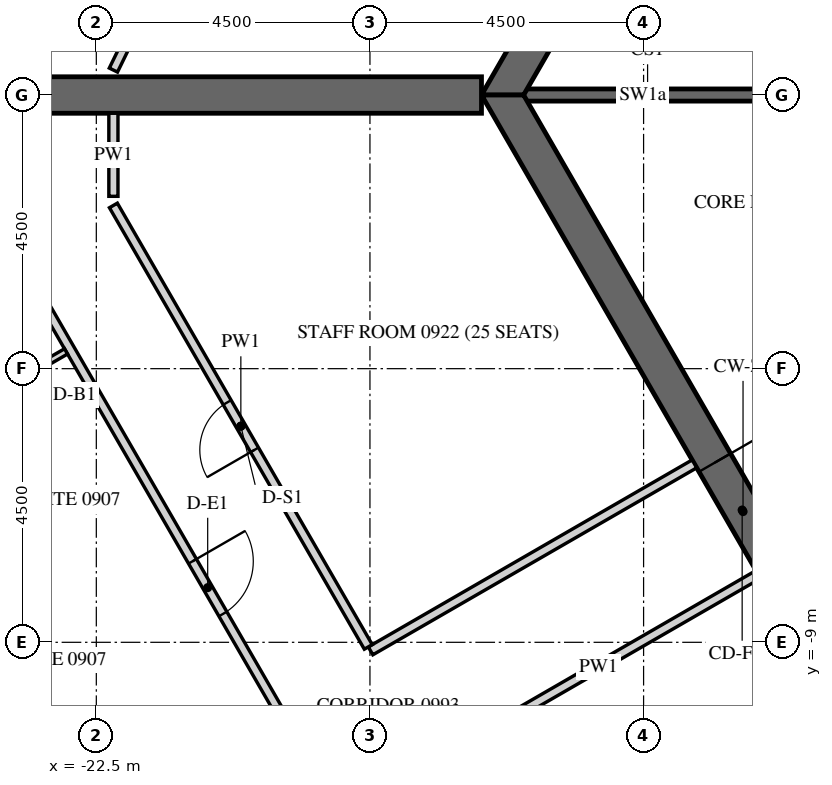
"""IFC4 building model, lengths in metres.
Left out: names, types, materials, properties, quantities, classifications, styles, units other than length and angle.
Written with IfcOpenShell. Run it as: python <this file> out.ifc"""

import sys

from ifc_helpers import new_model, si_unit, direction, frame, frame_2d, origin, place, context, subcontext, project, spatial, polyline, rectangle, outline, extrude, element, fill, save


model = new_model("IFC4")
c1 = context("Model", 3, precision=1e-05, world=origin(), true_north=direction((0.0, 1.0)))
c2 = subcontext(c1, "Body", "Model", "MODEL_VIEW")
j1 = project(units=[si_unit("LENGTHUNIT", "METRE"), si_unit("PLANEANGLEUNIT", "RADIAN")], contexts=[c1])
p1 = place(None, origin())
s1 = spatial("IfcSite", under=j1, at=p1, CompositionType="ELEMENT")
p2 = place(p1, origin())
s2 = spatial("IfcBuilding", under=s1, at=p2, CompositionType="ELEMENT")
p3 = place(p2, frame((0.0, 0.0, 123.3)))
s3 = spatial("IfcBuildingStorey", under=s2, at=p3, CompositionType="ELEMENT", Elevation=123.3)
p4 = place(p3, frame((-19.595, 27.633, -0.15), z_axis=(0.0, 0.0, 1.0), x_axis=(-0.438368285794, -0.898795441694, 0.0)))
e1 = element("IfcWall", 1, at=p4, inside=s3, PredefinedType="SOLIDWALL", context=c2, shape_type="SweptSolid", body=[
    extrude(outline(polyline([(-0.026, -0.275), (30.093, -0.275), (30.048, 0.275), (0.026, 0.275), (-0.026, -0.275)])), origin(), (0.0, 0.0, 1.0), 3.9),
])
p5 = place(p4, frame((1.236, 0.0, 1.05)))
e2 = element("IfcOpeningElement", 2, at=p5, cuts=e1, PredefinedType="OPENING", context=c2, shape_type="SweptSolid", body=[
    extrude(rectangle(XDim=2.4, YDim=2.4, at=frame_2d((1.2, 1.2))), frame((0.0, 0.285, 0.0), z_axis=(0.0, -1.0, 0.0), x_axis=(1.0, 0.0, 0.0)), (0.0, 0.0, 1.0), 0.57),
])
p6 = place(p4, frame((4.835, 0.0, 1.05)))
e3 = element("IfcOpeningElement", 3, at=p6, cuts=e1, PredefinedType="OPENING", context=c2, shape_type="SweptSolid", body=[
    extrude(rectangle(XDim=2.4, YDim=2.4, at=frame_2d((1.2, 1.2))), frame((0.0, 0.285, 0.0), z_axis=(0.0, -1.0, 0.0), x_axis=(1.0, 0.0, 0.0)), (0.0, 0.0, 1.0), 0.57),
])
p7 = place(p4, frame((8.436, 0.0, 1.05)))
e4 = element("IfcOpeningElement", 4, at=p7, cuts=e1, PredefinedType="OPENING", context=c2, shape_type="SweptSolid", body=[
    extrude(rectangle(XDim=2.4, YDim=2.4, at=frame_2d((1.2, 1.2))), frame((0.0, 0.285, 0.0), z_axis=(0.0, -1.0, 0.0), x_axis=(1.0, 0.0, 0.0)), (0.0, 0.0, 1.0), 0.57),
])
p8 = place(p4, frame((12.035, 0.0, 1.05)))
e5 = element("IfcOpeningElement", 5, at=p8, cuts=e1, PredefinedType="OPENING", context=c2, shape_type="SweptSolid", body=[
    extrude(rectangle(XDim=2.4, YDim=2.4, at=frame_2d((1.2, 1.2))), frame((0.0, 0.285, 0.0), z_axis=(0.0, -1.0, 0.0), x_axis=(1.0, 0.0, 0.0)), (0.0, 0.0, 1.0), 0.57),
])
p9 = place(p4, frame((15.635, 0.0, 1.05)))
e6 = element("IfcOpeningElement", 6, at=p9, cuts=e1, PredefinedType="OPENING", context=c2, shape_type="SweptSolid", body=[
    extrude(rectangle(XDim=2.4, YDim=2.4, at=frame_2d((1.2, 1.2))), frame((0.0, 0.285, 0.0), z_axis=(0.0, -1.0, 0.0), x_axis=(1.0, 0.0, 0.0)), (0.0, 0.0, 1.0), 0.57),
])
p10 = place(p4, frame((19.236, 0.0, 1.05)))
e7 = element("IfcOpeningElement", 7, at=p10, cuts=e1, PredefinedType="OPENING", context=c2, shape_type="SweptSolid", body=[
    extrude(rectangle(XDim=2.4, YDim=2.4, at=frame_2d((1.2, 1.2))), frame((0.0, 0.285, 0.0), z_axis=(0.0, -1.0, 0.0), x_axis=(1.0, 0.0, 0.0)), (0.0, 0.0, 1.0), 0.57),
])
p11 = place(p4, frame((22.835, 0.0, 1.05)))
e8 = element("IfcOpeningElement", 8, at=p11, cuts=e1, PredefinedType="OPENING", context=c2, shape_type="SweptSolid", body=[
    extrude(rectangle(XDim=2.4, YDim=2.4, at=frame_2d((1.2, 1.2))), frame((0.0, 0.285, 0.0), z_axis=(0.0, -1.0, 0.0), x_axis=(1.0, 0.0, 0.0)), (0.0, 0.0, 1.0), 0.57),
])
p12 = place(p4, frame((26.436, 0.0, 1.05)))
e9 = element("IfcOpeningElement", 9, at=p12, cuts=e1, PredefinedType="OPENING", context=c2, shape_type="SweptSolid", body=[
    extrude(rectangle(XDim=2.4, YDim=2.4, at=frame_2d((1.2, 1.2))), frame((0.0, 0.285, 0.0), z_axis=(0.0, -1.0, 0.0), x_axis=(1.0, 0.0, 0.0)), (0.0, 0.0, 1.0), 0.57),
])
p13 = place(p3, frame((-32.655, -2.89, -0.15), z_axis=(0.0, 0.0, 1.0), x_axis=(0.499997711317, -0.866026725152, 0.0)))
e10 = element("IfcWall", 10, at=p13, inside=s3, PredefinedType="SOLIDWALL", context=c2, shape_type="SweptSolid", body=[
    extrude(outline(polyline([(-0.022, -0.275), (30.097, -0.275), (30.045, 0.275), (0.022, 0.275), (-0.022, -0.275)])), origin(), (0.0, 0.0, 1.0), 3.9),
])
p14 = place(p13, frame((1.236, 0.0, 1.05)))
e11 = element("IfcOpeningElement", 11, at=p14, cuts=e10, PredefinedType="OPENING", context=c2, shape_type="SweptSolid", body=[
    extrude(rectangle(XDim=2.4, YDim=2.4, at=frame_2d((1.2, 1.2))), frame((0.0, 0.285, 0.0), z_axis=(0.0, -1.0, 0.0), x_axis=(1.0, 0.0, 0.0)), (0.0, 0.0, 1.0), 0.57),
])
p15 = place(p13, frame((4.835, 0.0, 1.05)))
e12 = element("IfcOpeningElement", 12, at=p15, cuts=e10, PredefinedType="OPENING", context=c2, shape_type="SweptSolid", body=[
    extrude(rectangle(XDim=2.4, YDim=2.4, at=frame_2d((1.2, 1.2))), frame((0.0, 0.285, 0.0), z_axis=(0.0, -1.0, 0.0), x_axis=(1.0, 0.0, 0.0)), (0.0, 0.0, 1.0), 0.57),
])
p16 = place(p13, frame((8.436, 0.0, 1.05)))
e13 = element("IfcOpeningElement", 13, at=p16, cuts=e10, PredefinedType="OPENING", context=c2, shape_type="SweptSolid", body=[
    extrude(rectangle(XDim=2.4, YDim=2.4, at=frame_2d((1.2, 1.2))), frame((0.0, 0.285, 0.0), z_axis=(0.0, -1.0, 0.0), x_axis=(1.0, 0.0, 0.0)), (0.0, 0.0, 1.0), 0.57),
])
p17 = place(p13, frame((12.035, 0.0, 1.05)))
e14 = element("IfcOpeningElement", 14, at=p17, cuts=e10, PredefinedType="OPENING", context=c2, shape_type="SweptSolid", body=[
    extrude(rectangle(XDim=2.4, YDim=2.4, at=frame_2d((1.2, 1.2))), frame((0.0, 0.285, 0.0), z_axis=(0.0, -1.0, 0.0), x_axis=(1.0, 0.0, 0.0)), (0.0, 0.0, 1.0), 0.57),
])
p18 = place(p13, frame((15.635, 0.0, 1.05)))
e15 = element("IfcOpeningElement", 15, at=p18, cuts=e10, PredefinedType="OPENING", context=c2, shape_type="SweptSolid", body=[
    extrude(rectangle(XDim=2.4, YDim=2.4, at=frame_2d((1.2, 1.2))), frame((0.0, 0.285, 0.0), z_axis=(0.0, -1.0, 0.0), x_axis=(1.0, 0.0, 0.0)), (0.0, 0.0, 1.0), 0.57),
])
p19 = place(p13, frame((19.236, 0.0, 1.05)))
e16 = element("IfcOpeningElement", 16, at=p19, cuts=e10, PredefinedType="OPENING", context=c2, shape_type="SweptSolid", body=[
    extrude(rectangle(XDim=2.4, YDim=2.4, at=frame_2d((1.2, 1.2))), frame((0.0, 0.285, 0.0), z_axis=(0.0, -1.0, 0.0), x_axis=(1.0, 0.0, 0.0)), (0.0, 0.0, 1.0), 0.57),
])
p20 = place(p13, frame((22.835, 0.0, 1.05)))
e17 = element("IfcOpeningElement", 17, at=p20, cuts=e10, PredefinedType="OPENING", context=c2, shape_type="SweptSolid", body=[
    extrude(rectangle(XDim=2.4, YDim=2.4, at=frame_2d((1.2, 1.2))), frame((0.0, 0.285, 0.0), z_axis=(0.0, -1.0, 0.0), x_axis=(1.0, 0.0, 0.0)), (0.0, 0.0, 1.0), 0.57),
])
p21 = place(p13, frame((26.436, 0.0, 1.05)))
e18 = element("IfcOpeningElement", 18, at=p21, cuts=e10, PredefinedType="OPENING", context=c2, shape_type="SweptSolid", body=[
    extrude(rectangle(XDim=2.4, YDim=2.4, at=frame_2d((1.2, 1.2))), frame((0.0, 0.285, 0.0), z_axis=(0.0, -1.0, 0.0), x_axis=(1.0, 0.0, 0.0)), (0.0, 0.0, 1.0), 0.57),
])
p22 = place(p3, frame((-7.91, 13.7, -0.15), z_axis=(0.0, 0.0, 1.0), x_axis=(-0.499999880136, -0.866025472988, 0.0)))
e19 = element("IfcWall", 19, at=p22, inside=s3, PredefinedType="SHEAR", context=c2, shape_type="SweptSolid", body=[
    extrude(outline(polyline([(-0.173, -0.3), (15.993, -0.3), (15.646, 0.3), (0.173, 0.3), (-0.173, -0.3)])), origin(), (0.0, 0.0, 1.0), 3.9),
])
p23 = place(p22, frame((7.039, 0.0, 0.15)))
e20 = element("IfcOpeningElement", 20, at=p23, cuts=e19, PredefinedType="OPENING", context=c2, shape_type="SweptSolid", body=[
    extrude(rectangle(XDim=1.8, YDim=2.4, at=frame_2d((0.9, 1.2))), frame((0.0, 0.31, 0.0), z_axis=(0.0, -1.0, 0.0), x_axis=(1.0, 0.0, 0.0)), (0.0, 0.0, 1.0), 0.62),
])
p24 = place(p3, frame((-15.819, 0.0, -0.15), z_axis=(0.0, 0.0, 1.0), x_axis=(0.499999880136, -0.866025472988, 0.0)))
e21 = element("IfcWall", 21, at=p24, inside=s3, PredefinedType="SHEAR", context=c2, shape_type="SweptSolid", body=[
    extrude(outline(polyline([(-0.173, -0.3), (15.993, -0.3), (15.646, 0.3), (0.173, 0.3), (-0.173, -0.3)])), origin(), (0.0, 0.0, 1.0), 3.9),
])
p25 = place(p24, frame((6.981, 0.0, 0.15)))
e22 = element("IfcOpeningElement", 22, at=p25, cuts=e21, PredefinedType="OPENING", context=c2, shape_type="SweptSolid", body=[
    extrude(rectangle(XDim=1.8, YDim=2.4, at=frame_2d((0.9, 1.2))), frame((0.0, 0.31, 0.0), z_axis=(0.0, -1.0, 0.0), x_axis=(1.0, 0.0, 0.0)), (0.0, 0.0, 1.0), 0.62),
])
p26 = place(p3, frame((-16.166, 0.0, -0.15), z_axis=(0.0, 0.0, 1.0), x_axis=(-1.0, 0.0, 0.0)))
e23 = element("IfcWall", 23, at=p26, inside=s3, PredefinedType="SHEAR", context=c2, shape_type="SweptSolid", body=[
    extrude(rectangle(XDim=16.509, YDim=0.6, at=frame_2d((8.254, 0.0))), origin(), (0.0, 0.0, 1.0), 3.9),
])
p27 = place(p26, frame((7.354, 0.0, 0.15)))
e24 = element("IfcOpeningElement", 24, at=p27, cuts=e23, PredefinedType="OPENING", context=c2, shape_type="SweptSolid", body=[
    extrude(rectangle(XDim=1.8, YDim=2.4, at=frame_2d((0.9, 1.2))), frame((0.0, 0.31, 0.0), z_axis=(0.0, -1.0, 0.0), x_axis=(1.0, 0.0, 0.0)), (0.0, 0.0, 1.0), 0.62),
])
p28 = place(p3, frame((-11.547, 0.0, -0.15), z_axis=(0.0, 0.0, 1.0), x_axis=(-1.0, 0.0, 0.0)))
e25 = element("IfcWall", 25, at=p28, inside=s3, PredefinedType="SHEAR", context=c2, shape_type="SweptSolid", body=[
    extrude(rectangle(XDim=3.926, YDim=0.2, at=frame_2d((1.963, 0.0))), origin(), (0.0, 0.0, 1.0), 3.9),
])
p29 = place(p3, frame((-22.219, 0.41, 0.0), z_axis=(0.0, 0.0, 1.0), x_axis=(0.438391891827, 0.898783927972, 0.0)))
e26 = element("IfcWall", 26, at=p29, inside=s3, PredefinedType="PARTITIONING", context=c2, shape_type="SweptSolid", body=[
    extrude(rectangle(XDim=9.699, YDim=0.15, at=frame_2d((4.85, 0.0))), origin(), (0.0, 0.0, 1.0), 2.988),
])
p30 = place(p29, frame((4.4, 0.0, 0.0)))
e27 = element("IfcOpeningElement", 27, at=p30, cuts=e26, PredefinedType="OPENING", context=c2, shape_type="SweptSolid", body=[
    extrude(rectangle(XDim=0.9, YDim=2.1, at=frame_2d((0.45, 1.05))), frame((0.0, 0.085, 0.0), z_axis=(0.0, -1.0, 0.0), x_axis=(1.0, 0.0, 0.0)), (0.0, 0.0, 1.0), 0.17),
])
p31 = place(p3, frame((-24.09, -2.175, 0.0), z_axis=(0.0, 0.0, 1.0), x_axis=(0.499996832073, -0.86602723278, 0.0)))
e28 = element("IfcWall", 28, at=p31, inside=s3, PredefinedType="PARTITIONING", context=c2, shape_type="SweptSolid", body=[
    extrude(rectangle(XDim=23.877, YDim=0.15, at=frame_2d((11.938, 0.0))), origin(), (0.0, 0.0, 1.0), 2.988),
])
p32 = place(p31, frame((6.343, 0.0, 0.0)))
e29 = element("IfcOpeningElement", 29, at=p32, cuts=e28, PredefinedType="OPENING", context=c2, shape_type="SweptSolid", body=[
    extrude(rectangle(XDim=1.0, YDim=2.1, at=frame_2d((0.5, 1.05))), frame((0.0, 0.085, 0.0), z_axis=(0.0, -1.0, 0.0), x_axis=(1.0, 0.0, 0.0)), (0.0, 0.0, 1.0), 0.17),
])
p33 = place(p31, frame((13.172, 0.0, 0.0)))
e30 = element("IfcOpeningElement", 30, at=p33, cuts=e28, PredefinedType="OPENING", context=c2, shape_type="SweptSolid", body=[
    extrude(rectangle(XDim=1.0, YDim=2.1, at=frame_2d((0.5, 1.05))), frame((0.0, 0.085, 0.0), z_axis=(0.0, -1.0, 0.0), x_axis=(1.0, 0.0, 0.0)), (0.0, 0.0, 1.0), 0.17),
])
p34 = place(p31, frame((19.625, 0.0, 0.0)))
e31 = element("IfcOpeningElement", 31, at=p34, cuts=e28, PredefinedType="OPENING", context=c2, shape_type="SweptSolid", body=[
    extrude(rectangle(XDim=1.0, YDim=2.1, at=frame_2d((0.5, 1.05))), frame((0.0, 0.085, 0.0), z_axis=(0.0, -1.0, 0.0), x_axis=(1.0, 0.0, 0.0)), (0.0, 0.0, 1.0), 0.17),
])
p35 = place(p3, frame((-12.664, -6.066, 0.0), z_axis=(0.0, 0.0, 1.0), x_axis=(-0.866023618125, -0.500003092839, 0.0)))
e32 = element("IfcWall", 32, at=p35, inside=s3, PredefinedType="PARTITIONING", context=c2, shape_type="SweptSolid", body=[
    extrude(rectangle(XDim=6.15, YDim=0.15, at=frame_2d((3.075, 0.0))), origin(), (0.0, 0.0, 1.0), 2.988),
])
p36 = place(p3, frame((-18.027, -9.076, 0.0), z_axis=(0.0, 0.0, 1.0), x_axis=(-0.500007318041, 0.86602117867, 0.0)))
e33 = element("IfcWall", 33, at=p36, inside=s3, PredefinedType="PARTITIONING", context=c2, shape_type="SweptSolid", body=[
    extrude(rectangle(XDim=8.383, YDim=0.15, at=frame_2d((4.191, 0.0))), origin(), (0.0, 0.0, 1.0), 2.988),
])
p37 = place(p36, frame((3.742, 0.0, 0.0)))
e34 = element("IfcOpeningElement", 34, at=p37, cuts=e33, PredefinedType="OPENING", context=c2, shape_type="SweptSolid", body=[
    extrude(rectangle(XDim=0.9, YDim=2.1, at=frame_2d((0.45, 1.05))), frame((0.0, 0.085, 0.0), z_axis=(0.0, -1.0, 0.0), x_axis=(1.0, 0.0, 0.0)), (0.0, 0.0, 1.0), 0.17),
])
p38 = place(p3, frame((-22.219, -1.666, 0.0), z_axis=(0.0, 0.0, 1.0), x_axis=(0.0, 1.0, 0.0)))
e35 = element("IfcWall", 35, at=p38, inside=s3, PredefinedType="PARTITIONING", context=c2, shape_type="SweptSolid", body=[
    extrude(rectangle(XDim=1.366, YDim=0.15, at=frame_2d((0.683, 0.0))), origin(), (0.0, 0.0, 1.0), 2.988),
])
p39 = place(p3, frame((-16.875, -10.922, 0.0), z_axis=(0.0, 0.0, 1.0), x_axis=(0.866023634079, 0.500003065207, 0.0)))
e36 = element("IfcWall", 36, at=p39, inside=s3, PredefinedType="PARTITIONING", context=c2, shape_type="SweptSolid", body=[
    extrude(rectangle(XDim=6.075, YDim=0.15, at=frame_2d((3.038, 0.0))), origin(), (0.0, 0.0, 1.0), 2.988),
])
p40 = place(p3, frame((-22.998, -4.216, 0.0), z_axis=(0.0, 0.0, 1.0), x_axis=(-0.866025730634, -0.499999433879, 0.0)))
e37 = element("IfcWall", 37, at=p40, inside=s3, PredefinedType="PARTITIONING", context=c2, shape_type="SweptSolid", body=[
    extrude(rectangle(XDim=2.925, YDim=0.1, at=frame_2d((1.462, 0.0))), origin(), (0.0, 0.0, 1.0), 2.988),
])
p41 = place(p40, frame((1.025, 0.0, 0.0)))
e38 = element("IfcOpeningElement", 38, at=p41, cuts=e37, PredefinedType="OPENING", context=c2, shape_type="SweptSolid", body=[
    extrude(rectangle(XDim=0.8, YDim=2.1, at=frame_2d((0.4, 1.05))), frame((0.0, 0.06, 0.0), z_axis=(0.0, -1.0, 0.0), x_axis=(1.0, 0.0, 0.0)), (0.0, 0.0, 1.0), 0.12),
])
p42 = place(p3, frame((-26.136, -8.232, 0.0), z_axis=(0.0, 0.0, 1.0), x_axis=(0.499995846692, -0.866027801685, 0.0)))
e39 = element("IfcWall", 39, at=p42, inside=s3, PredefinedType="PARTITIONING", context=c2, shape_type="SweptSolid", body=[
    extrude(rectangle(XDim=7.06, YDim=0.1, at=frame_2d((3.53, 0.0))), origin(), (0.0, 0.0, 1.0), 2.988),
])
p43 = place(p42, frame((3.1, 0.0, 0.0)))
e40 = element("IfcOpeningElement", 40, at=p43, cuts=e39, PredefinedType="OPENING", context=c2, shape_type="SweptSolid", body=[
    extrude(rectangle(XDim=0.9, YDim=2.1, at=frame_2d((0.45, 1.05))), frame((0.0, 0.06, 0.0), z_axis=(0.0, -1.0, 0.0), x_axis=(1.0, 0.0, 0.0)), (0.0, 0.0, 1.0), 0.12),
])
p44 = place(p25, origin())
e41 = element("IfcDoor", 41, at=p44, inside=s3, OperationType="DOUBLE_DOOR_SINGLE_SWING", PredefinedType="DOOR", context=c2, shape_type="SweptSolid", body=[
    extrude(rectangle(XDim=1.8, YDim=2.4, at=frame_2d((0.9, 1.2))), frame((0.0, 0.025, 0.0), z_axis=(0.0, -1.0, 0.0), x_axis=(1.0, 0.0, 0.0)), (0.0, 0.0, 1.0), 0.05),
])
fill(e22, e41)
p45 = place(p32, origin())
e42 = element("IfcDoor", 42, at=p45, inside=s3, OperationType="SINGLE_SWING_LEFT", PredefinedType="DOOR", context=c2, shape_type="SweptSolid", body=[
    extrude(rectangle(XDim=1.0, YDim=2.1, at=frame_2d((0.5, 1.05))), frame((0.0, 0.025, 0.0), z_axis=(0.0, -1.0, 0.0), x_axis=(1.0, 0.0, 0.0)), (0.0, 0.0, 1.0), 0.05),
])
fill(e29, e42)
p46 = place(p37, origin())
e43 = element("IfcDoor", 43, at=p46, inside=s3, OperationType="SINGLE_SWING_RIGHT", PredefinedType="DOOR", context=c2, shape_type="SweptSolid", body=[
    extrude(rectangle(XDim=0.9, YDim=2.1, at=frame_2d((0.45, 1.05))), frame((0.0, 0.025, 0.0), z_axis=(0.0, -1.0, 0.0), x_axis=(1.0, 0.0, 0.0)), (0.0, 0.0, 1.0), 0.05),
])
fill(e34, e43)
save(model, sys.argv[1])
